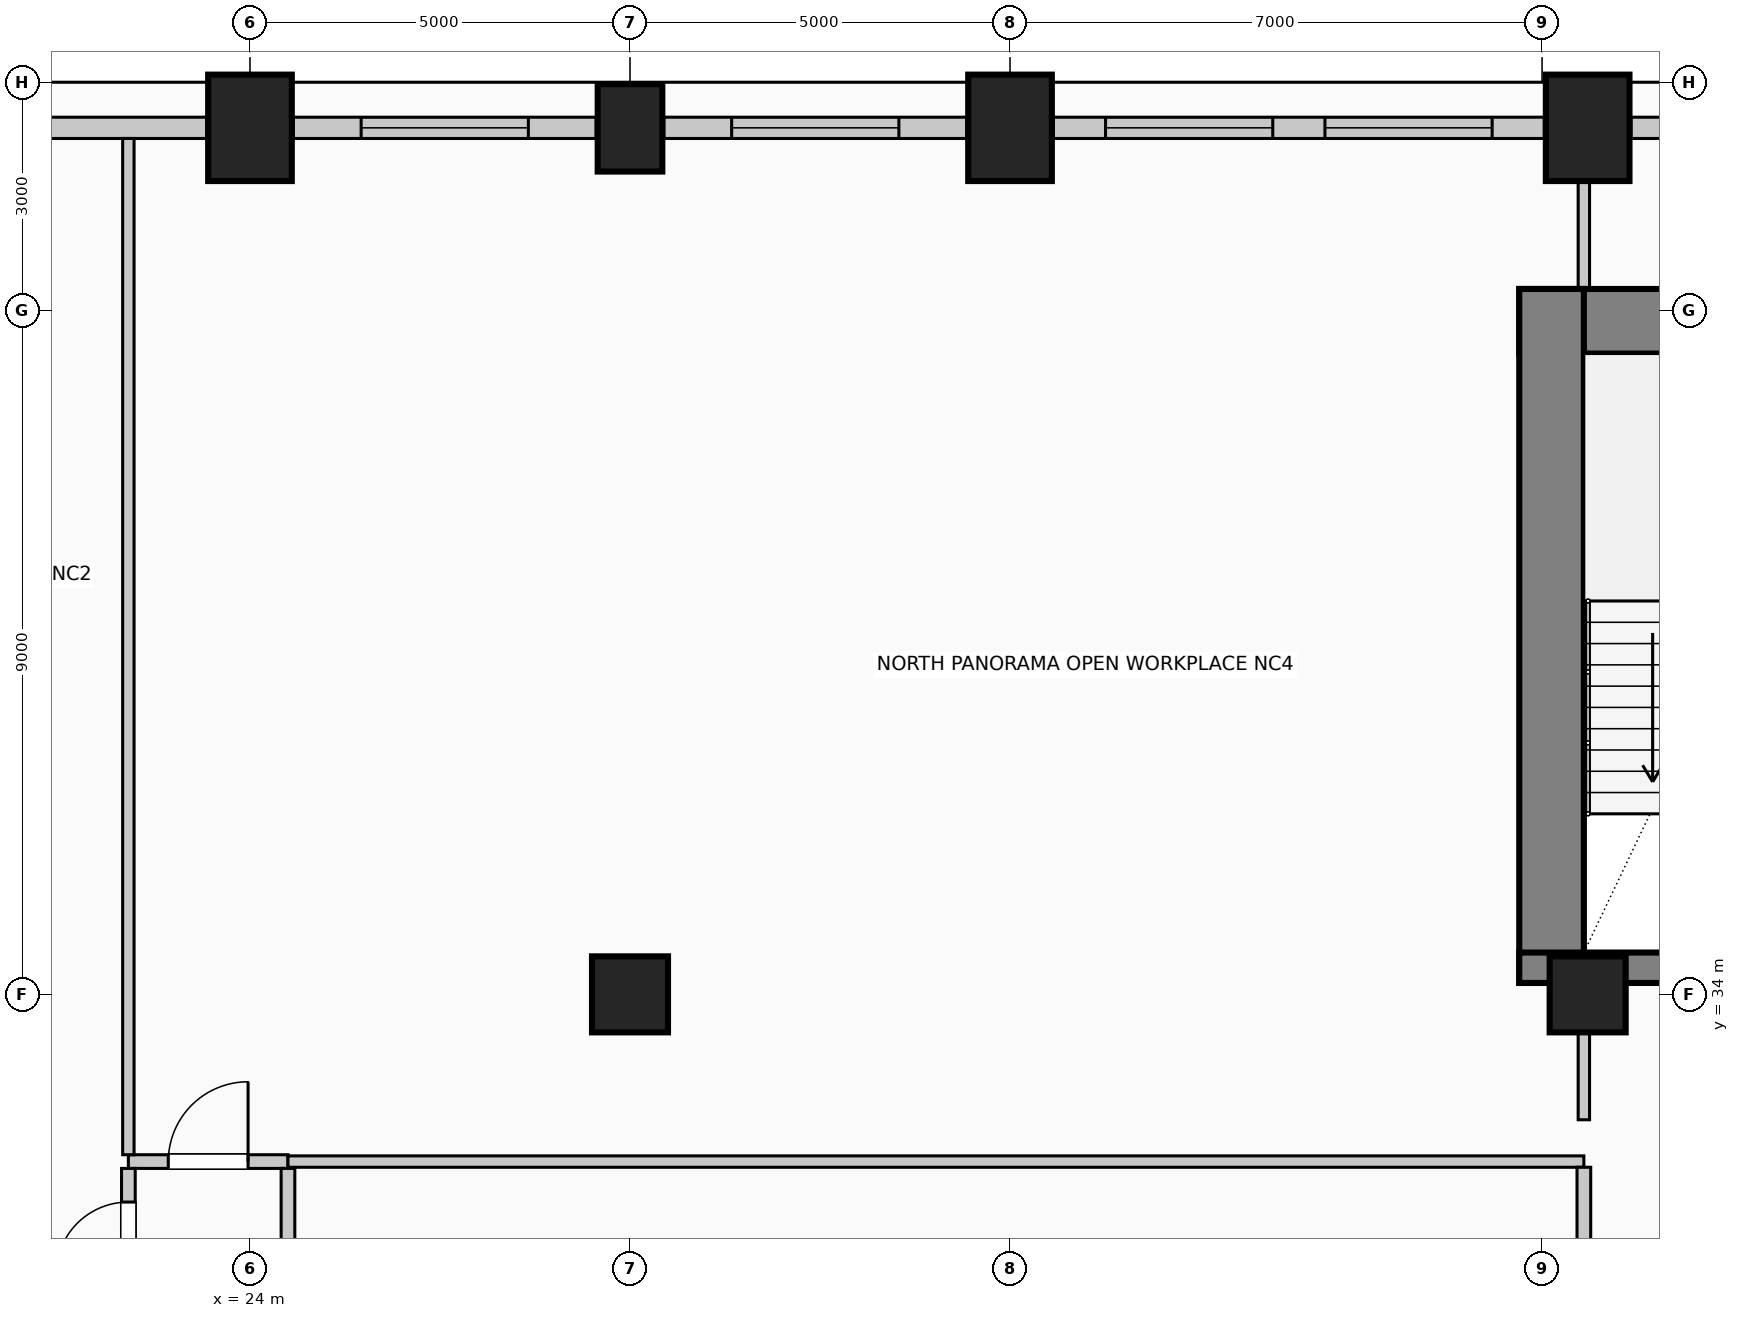
"""IFC4 building model, lengths in metres.
Left out: names, types, materials, properties, quantities, classifications, styles, units other than length and angle.
Written with IfcOpenShell. Run it as: python <this file> out.ifc"""

import sys

from ifc_helpers import new_model, si_unit, direction, frame, frame_2d, origin, origin_2d, place, context, subcontext, project, spatial, rectangle, circle, extrude, element, fill, save


model = new_model("IFC4")
c1 = context("Model", 3, precision=1e-05, world=origin(), true_north=direction((0.0, 1.0)))
c2 = subcontext(c1, "Body", "Model", "MODEL_VIEW")
j1 = project(units=[si_unit("LENGTHUNIT", "METRE"), si_unit("PLANEANGLEUNIT", "RADIAN")], contexts=[c1])
p1 = place(None, origin())
s1 = spatial("IfcSite", under=j1, at=p1, CompositionType="ELEMENT")
p2 = place(p1, origin())
s2 = spatial("IfcBuilding", under=s1, at=p2, CompositionType="ELEMENT")
p3 = place(p2, frame((0.0, 0.0, 132.6)))
s3 = spatial("IfcBuildingStorey", under=s2, at=p3, CompositionType="ELEMENT", Elevation=132.6)
p4 = place(p3, frame((40.7, 42.855, 0.0), z_axis=(0.0, 0.0, 1.0), x_axis=(1.0, 0.0, 0.0)))
e1 = element("IfcWall", 1, at=p4, inside=s3, PredefinedType="SHEAR", context=c2, shape_type="SweptSolid", body=[
    extrude(rectangle(XDim=14.6, YDim=0.85, at=frame_2d((7.3, 0.0))), origin(), (0.0, 0.0, 1.0), 4.0),
])
p5 = place(p3, frame((41.125, 34.15, 0.0), z_axis=(0.0, 0.0, 1.0), x_axis=(0.0, 1.0, 0.0)))
e2 = element("IfcWall", 2, at=p5, inside=s3, PredefinedType="SHEAR", context=c2, shape_type="SweptSolid", body=[
    extrude(rectangle(XDim=9.13, YDim=0.85, at=frame_2d((4.565, 0.0))), origin(), (0.0, 0.0, 1.0), 4.0),
])
p6 = place(p3, frame((40.7, 34.35, 0.0), z_axis=(0.0, 0.0, 1.0), x_axis=(1.0, 0.0, 0.0)))
e3 = element("IfcWall", 3, at=p6, inside=s3, PredefinedType="SHEAR", context=c2, shape_type="SweptSolid", body=[
    extrude(rectangle(XDim=5.01, YDim=0.4, at=frame_2d((2.505, 0.0))), origin(), (0.0, 0.0, 1.0), 4.0),
])
p7 = place(p6, frame((2.4, 0.0, 0.0)))
e4 = element("IfcOpeningElement", 4, at=p7, cuts=e3, PredefinedType="OPENING", context=c2, shape_type="SweptSolid", body=[
    extrude(rectangle(XDim=1.15, YDim=2.2, at=frame_2d((0.575, 1.1))), frame((0.0, 0.21, 0.0), z_axis=(0.0, -1.0, 0.0), x_axis=(1.0, 0.0, 0.0)), (0.0, 0.0, 1.0), 0.42),
])
p8 = place(p3, frame((24.0, 45.4, 0.0), z_axis=(0.0, 0.0, 1.0), x_axis=(1.0, 0.0, 0.0)))
e5 = element("IfcColumn", 5, at=p8, inside=s3, PredefinedType="COLUMN", context=c2, shape_type="SweptSolid", body=[
    extrude(rectangle(XDim=1.1, YDim=1.4, at=origin_2d()), origin(), (0.0, 0.0, 1.0), 4.0),
])
p9 = place(p3, frame((29.0, 45.4, 0.0), z_axis=(0.0, 0.0, 1.0), x_axis=(1.0, 0.0, 0.0)))
e6 = element("IfcColumn", 6, at=p9, inside=s3, PredefinedType="COLUMN", context=c2, shape_type="SweptSolid", body=[
    extrude(rectangle(XDim=0.85, YDim=1.15, at=origin_2d()), origin(), (0.0, 0.0, 1.0), 4.0),
])
for number, where, z_axis, x_axis in (
    (7, (34.0, 45.4, 0.0), (0.0, 0.0, 1.0), (1.0, 0.0, 0.0)),
    (8, (41.6, 45.4, 0.0), (0.0, 0.0, 1.0), (1.0, 0.0, 0.0)),
):
    element("IfcColumn", number, at=place(p3, frame(where, z_axis=z_axis, x_axis=x_axis)), inside=s3, PredefinedType="COLUMN", context=c2, shape_type="SweptSolid", body=[
        extrude(rectangle(XDim=1.1, YDim=1.4, at=origin_2d()), origin(), (0.0, 0.0, 1.0), 4.0),
    ])
for number, where, z_axis, x_axis in (
    (9, (29.0, 34.0, 0.0), (0.0, 0.0, 1.0), (1.0, 0.0, 0.0)),
    (10, (41.6, 34.0, 0.0), (0.0, 0.0, 1.0), (1.0, 0.0, 0.0)),
):
    element("IfcColumn", number, at=place(p3, frame(where, z_axis=z_axis, x_axis=x_axis)), inside=s3, PredefinedType="COLUMN", context=c2, shape_type="SweptSolid", body=[
        extrude(circle(Radius=0.5, at=origin_2d()), origin(), (0.0, 0.0, 1.0), 4.0),
    ])
p10 = place(p3, frame((16.97, 45.4, 0.0), z_axis=(0.0, 0.0, 1.0), x_axis=(1.0, 0.0, 0.0)))
e11 = element("IfcWall", 11, at=p10, inside=s3, PredefinedType="SOLIDWALL", context=c2, shape_type="SweptSolid", body=[
    extrude(rectangle(XDim=6.46, YDim=0.28, at=frame_2d((3.23, 0.0))), origin(), (0.0, 0.0, 1.0), 2.875),
])
p11 = place(p10, frame((0.687, 0.0, 0.5)))
e12 = element("IfcOpeningElement", 12, at=p11, cuts=e11, PredefinedType="OPENING", context=c2, shape_type="SweptSolid", body=[
    extrude(rectangle(XDim=2.2, YDim=1.95, at=frame_2d((1.1, 0.975))), frame((0.0, 0.15, 0.0), z_axis=(0.0, -1.0, 0.0), x_axis=(1.0, 0.0, 0.0)), (0.0, 0.0, 1.0), 0.3),
])
p12 = place(p3, frame((24.57, 45.4, 0.0), z_axis=(0.0, 0.0, 1.0), x_axis=(1.0, 0.0, 0.0)))
e13 = element("IfcWall", 13, at=p12, inside=s3, PredefinedType="SOLIDWALL", context=c2, shape_type="SweptSolid", body=[
    extrude(rectangle(XDim=3.985, YDim=0.28, at=frame_2d((1.992, 0.0))), origin(), (0.0, 0.0, 1.0), 2.875),
])
p13 = place(p12, frame((0.893, 0.0, 0.5)))
e14 = element("IfcOpeningElement", 14, at=p13, cuts=e13, PredefinedType="OPENING", context=c2, shape_type="SweptSolid", body=[
    extrude(rectangle(XDim=2.2, YDim=1.95, at=frame_2d((1.1, 0.975))), frame((0.0, 0.15, 0.0), z_axis=(0.0, -1.0, 0.0), x_axis=(1.0, 0.0, 0.0)), (0.0, 0.0, 1.0), 0.3),
])
p14 = place(p3, frame((29.445, 45.4, 0.0), z_axis=(0.0, 0.0, 1.0), x_axis=(1.0, 0.0, 0.0)))
e15 = element("IfcWall", 15, at=p14, inside=s3, PredefinedType="SOLIDWALL", context=c2, shape_type="SweptSolid", body=[
    extrude(rectangle(XDim=3.985, YDim=0.28, at=frame_2d((1.992, 0.0))), origin(), (0.0, 0.0, 1.0), 2.875),
])
p15 = place(p14, frame((0.893, 0.0, 0.5)))
e16 = element("IfcOpeningElement", 16, at=p15, cuts=e15, PredefinedType="OPENING", context=c2, shape_type="SweptSolid", body=[
    extrude(rectangle(XDim=2.2, YDim=1.95, at=frame_2d((1.1, 0.975))), frame((0.0, 0.15, 0.0), z_axis=(0.0, -1.0, 0.0), x_axis=(1.0, 0.0, 0.0)), (0.0, 0.0, 1.0), 0.3),
])
p16 = place(p3, frame((34.57, 45.4, 0.0), z_axis=(0.0, 0.0, 1.0), x_axis=(1.0, 0.0, 0.0)))
e17 = element("IfcWall", 17, at=p16, inside=s3, PredefinedType="SOLIDWALL", context=c2, shape_type="SweptSolid", body=[
    extrude(rectangle(XDim=6.46, YDim=0.28, at=frame_2d((3.23, 0.0))), origin(), (0.0, 0.0, 1.0), 2.875),
])
p17 = place(p16, frame((0.687, 0.0, 0.5)))
e18 = element("IfcOpeningElement", 18, at=p17, cuts=e17, PredefinedType="OPENING", context=c2, shape_type="SweptSolid", body=[
    extrude(rectangle(XDim=2.2, YDim=1.95, at=frame_2d((1.1, 0.975))), frame((0.0, 0.15, 0.0), z_axis=(0.0, -1.0, 0.0), x_axis=(1.0, 0.0, 0.0)), (0.0, 0.0, 1.0), 0.3),
])
p18 = place(p16, frame((3.573, 0.0, 0.5)))
e19 = element("IfcOpeningElement", 19, at=p18, cuts=e17, PredefinedType="OPENING", context=c2, shape_type="SweptSolid", body=[
    extrude(rectangle(XDim=2.2, YDim=1.95, at=frame_2d((1.1, 0.975))), frame((0.0, 0.15, 0.0), z_axis=(0.0, -1.0, 0.0), x_axis=(1.0, 0.0, 0.0)), (0.0, 0.0, 1.0), 0.3),
])
p19 = place(p3, frame((42.17, 45.4, 0.0), z_axis=(0.0, 0.0, 1.0), x_axis=(1.0, 0.0, 0.0)))
e20 = element("IfcWall", 20, at=p19, inside=s3, PredefinedType="SOLIDWALL", context=c2, shape_type="SweptSolid", body=[
    extrude(rectangle(XDim=1.385, YDim=0.28, at=frame_2d((0.692, 0.0))), origin(), (0.0, 0.0, 1.0), 2.875),
])
p20 = place(p3, frame((22.4, 31.8, 0.0), z_axis=(0.0, 0.0, 1.0), x_axis=(1.0, 0.0, 0.0)))
e21 = element("IfcWall", 21, at=p20, inside=s3, PredefinedType="PARTITIONING", context=c2, shape_type="SweptSolid", body=[
    extrude(rectangle(XDim=2.1, YDim=0.18, at=frame_2d((1.05, 0.0))), origin(), (0.0, 0.0, 1.0), 3.725),
])
p21 = place(p20, frame((0.525, 0.0, 0.0)))
e22 = element("IfcOpeningElement", 22, at=p21, cuts=e21, PredefinedType="OPENING", context=c2, shape_type="SweptSolid", body=[
    extrude(rectangle(XDim=1.05, YDim=2.15, at=frame_2d((0.525, 1.075))), frame((0.0, 0.1, 0.0), z_axis=(0.0, -1.0, 0.0), x_axis=(1.0, 0.0, 0.0)), (0.0, 0.0, 1.0), 0.2),
])
p22 = place(p3, frame((24.5, 31.8, 0.0), z_axis=(0.0, 0.0, 1.0), x_axis=(1.0, 0.0, 0.0)))
e23 = element("IfcWall", 23, at=p22, inside=s3, PredefinedType="PARTITIONING", context=c2, shape_type="SweptSolid", body=[
    extrude(rectangle(XDim=17.05, YDim=0.15, at=frame_2d((8.525, 0.0))), origin(), (0.0, 0.0, 1.0), 3.725),
])
p23 = place(p3, frame((22.4, 29.875, 0.0), z_axis=(0.0, 0.0, 1.0), x_axis=(0.0, 1.0, 0.0)))
e24 = element("IfcWall", 24, at=p23, inside=s3, PredefinedType="PARTITIONING", context=c2, shape_type="SweptSolid", body=[
    extrude(rectangle(XDim=1.835, YDim=0.18, at=frame_2d((0.917, 0.0))), origin(), (0.0, 0.0, 1.0), 3.725),
])
p24 = place(p23, frame((0.442, 0.0, 0.0)))
e25 = element("IfcOpeningElement", 25, at=p24, cuts=e24, PredefinedType="OPENING", context=c2, shape_type="SweptSolid", body=[
    extrude(rectangle(XDim=0.95, YDim=2.15, at=frame_2d((0.475, 1.075))), frame((0.0, 0.1, 0.0), z_axis=(0.0, -1.0, 0.0), x_axis=(1.0, 0.0, 0.0)), (0.0, 0.0, 1.0), 0.2),
])
p25 = place(p3, frame((22.4, 31.89, 0.0), z_axis=(0.0, 0.0, 1.0), x_axis=(0.0, 1.0, 0.0)))
e26 = element("IfcWall", 26, at=p25, inside=s3, PredefinedType="PARTITIONING", context=c2, shape_type="SweptSolid", body=[
    extrude(rectangle(XDim=13.37, YDim=0.15, at=frame_2d((6.685, 0.0))), origin(), (0.0, 0.0, 1.0), 3.725),
])
p26 = place(p3, frame((24.5, 15.74, 0.0), z_axis=(0.0, 0.0, 1.0), x_axis=(0.0, 1.0, 0.0)))
e27 = element("IfcWall", 27, at=p26, inside=s3, PredefinedType="PARTITIONING", context=c2, shape_type="SweptSolid", body=[
    extrude(rectangle(XDim=15.97, YDim=0.18, at=frame_2d((7.985, 0.0))), origin(), (0.0, 0.0, 1.0), 3.725),
])
p27 = place(p3, frame((41.55, 18.5, 0.0), z_axis=(0.0, 0.0, 1.0), x_axis=(0.0, 1.0, 0.0)))
e28 = element("IfcWall", 28, at=p27, inside=s3, PredefinedType="PARTITIONING", context=c2, shape_type="SweptSolid", body=[
    extrude(rectangle(XDim=13.225, YDim=0.18, at=frame_2d((6.613, 0.0))), origin(), (0.0, 0.0, 1.0), 3.07),
])
p28 = place(p3, frame((41.55, 32.35, 0.0), z_axis=(0.0, 0.0, 1.0), x_axis=(0.0, 1.0, 0.0)))
e29 = element("IfcWall", 29, at=p28, inside=s3, PredefinedType="PARTITIONING", context=c2, shape_type="SweptSolid", body=[
    extrude(rectangle(XDim=1.15, YDim=0.15, at=frame_2d((0.575, 0.0))), origin(), (0.0, 0.0, 1.0), 3.07),
])
p29 = place(p3, frame((41.55, 43.28, 0.0), z_axis=(0.0, 0.0, 1.0), x_axis=(0.0, 1.0, 0.0)))
e30 = element("IfcWall", 30, at=p29, inside=s3, PredefinedType="PARTITIONING", context=c2, shape_type="SweptSolid", body=[
    extrude(rectangle(XDim=1.42, YDim=0.15, at=frame_2d((0.71, 0.0))), origin(), (0.0, 0.0, 1.0), 3.725),
])
p30 = place(p13, origin())
e31 = element("IfcWindow", 31, at=p30, inside=s3, PartitioningType="SINGLE_PANEL", PredefinedType="WINDOW", context=c2, shape_type="SweptSolid", body=[
    extrude(rectangle(XDim=2.2, YDim=1.95, at=frame_2d((1.1, 0.975))), frame((0.0, 0.03, 0.0), z_axis=(0.0, -1.0, 0.0), x_axis=(1.0, 0.0, 0.0)), (0.0, 0.0, 1.0), 0.06),
])
fill(e14, e31)
p31 = place(p15, origin())
e32 = element("IfcWindow", 32, at=p31, inside=s3, PartitioningType="SINGLE_PANEL", PredefinedType="WINDOW", context=c2, shape_type="SweptSolid", body=[
    extrude(rectangle(XDim=2.2, YDim=1.95, at=frame_2d((1.1, 0.975))), frame((0.0, 0.03, 0.0), z_axis=(0.0, -1.0, 0.0), x_axis=(1.0, 0.0, 0.0)), (0.0, 0.0, 1.0), 0.06),
])
fill(e16, e32)
p32 = place(p17, origin())
e33 = element("IfcWindow", 33, at=p32, inside=s3, PartitioningType="SINGLE_PANEL", PredefinedType="WINDOW", context=c2, shape_type="SweptSolid", body=[
    extrude(rectangle(XDim=2.2, YDim=1.95, at=frame_2d((1.1, 0.975))), frame((0.0, 0.03, 0.0), z_axis=(0.0, -1.0, 0.0), x_axis=(1.0, 0.0, 0.0)), (0.0, 0.0, 1.0), 0.06),
])
fill(e18, e33)
p33 = place(p18, origin())
e34 = element("IfcWindow", 34, at=p33, inside=s3, PartitioningType="SINGLE_PANEL", PredefinedType="WINDOW", context=c2, shape_type="SweptSolid", body=[
    extrude(rectangle(XDim=2.2, YDim=1.95, at=frame_2d((1.1, 0.975))), frame((0.0, 0.03, 0.0), z_axis=(0.0, -1.0, 0.0), x_axis=(1.0, 0.0, 0.0)), (0.0, 0.0, 1.0), 0.06),
])
fill(e19, e34)
p34 = place(p21, origin())
e35 = element("IfcDoor", 35, at=p34, inside=s3, OperationType="SINGLE_SWING_RIGHT", PredefinedType="DOOR", context=c2, shape_type="SweptSolid", body=[
    extrude(rectangle(XDim=1.05, YDim=2.15, at=frame_2d((0.525, 1.075))), frame((0.0, 0.025, 0.0), z_axis=(0.0, -1.0, 0.0), x_axis=(1.0, 0.0, 0.0)), (0.0, 0.0, 1.0), 0.05),
])
fill(e22, e35)
p35 = place(p24, origin())
e36 = element("IfcDoor", 36, at=p35, inside=s3, OperationType="SINGLE_SWING_LEFT", PredefinedType="DOOR", context=c2, shape_type="SweptSolid", body=[
    extrude(rectangle(XDim=0.95, YDim=2.15, at=frame_2d((0.475, 1.075))), frame((0.0, 0.025, 0.0), z_axis=(0.0, -1.0, 0.0), x_axis=(1.0, 0.0, 0.0)), (0.0, 0.0, 1.0), 0.05),
])
fill(e25, e36)
save(model, sys.argv[1])
